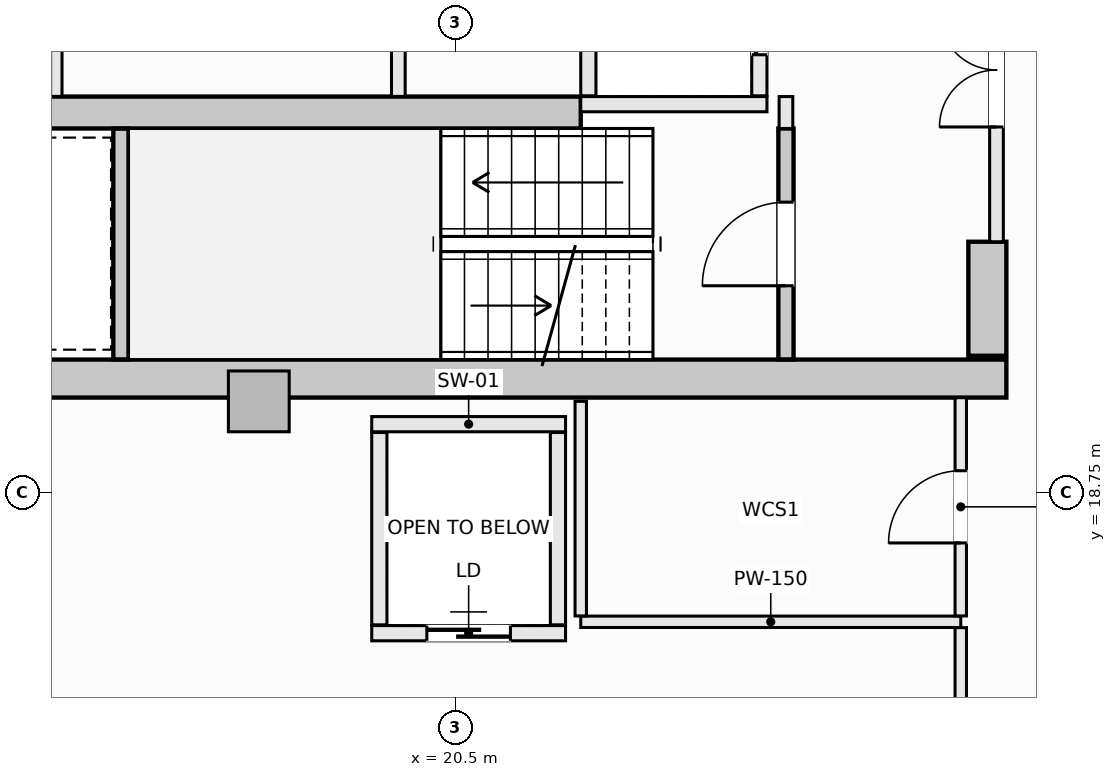
"""IFC4 building model, lengths in metres.
Left out: names, types, materials, properties, quantities, classifications, styles, units other than length and angle.
Written with IfcOpenShell. Run it as: python <this file> out.ifc"""

import sys

from ifc_helpers import new_model, si_unit, direction, frame, frame_2d, origin, origin_2d, place, context, subcontext, project, spatial, rectangle, extrude, element, fill, save


model = new_model("IFC4")
c1 = context("Model", 3, precision=1e-05, world=origin(), true_north=direction((0.0, 1.0)))
c2 = subcontext(c1, "Body", "Model", "MODEL_VIEW")
j1 = project(units=[si_unit("LENGTHUNIT", "METRE"), si_unit("PLANEANGLEUNIT", "RADIAN")], contexts=[c1])
p1 = place(None, origin())
s1 = spatial("IfcSite", under=j1, at=p1, CompositionType="ELEMENT")
p2 = place(p1, origin())
s2 = spatial("IfcBuilding", under=s1, at=p2, CompositionType="ELEMENT")
p3 = place(p2, frame((0.0, 0.0, 209.6)))
s3 = spatial("IfcBuildingStorey", under=s2, at=p3, CompositionType="ELEMENT", Elevation=209.6)
p4 = place(p3, frame((14.25, 20.25, -0.27), z_axis=(0.0, 0.0, 1.0), x_axis=(1.0, 0.0, 0.0)))
e1 = element("IfcWall", 1, at=p4, inside=s3, PredefinedType="SHEAR", context=c2, shape_type="SweptSolid", body=[
    extrude(rectangle(XDim=13.5, YDim=0.5, at=frame_2d((6.75, 0.0))), origin(), (0.0, 0.0, 1.0), 3.3),
])
p5 = place(p3, frame((27.5, 20.55, -0.27), z_axis=(0.0, 0.0, 1.0), x_axis=(0.0, 1.0, 0.0)))
e2 = element("IfcWall", 2, at=p5, inside=s3, PredefinedType="SHEAR", context=c2, shape_type="SweptSolid", body=[
    extrude(rectangle(XDim=1.5, YDim=0.5, at=frame_2d((0.75, 0.0))), origin(), (0.0, 0.0, 1.0), 3.3),
])
p6 = place(p3, frame((14.85, 23.75, -0.27), z_axis=(0.0, 0.0, 1.0), x_axis=(1.0, 0.0, 0.0)))
e3 = element("IfcWall", 3, at=p6, inside=s3, PredefinedType="SHEAR", context=c2, shape_type="SweptSolid", body=[
    extrude(rectangle(XDim=7.3, YDim=0.42, at=frame_2d((3.65, 0.0))), origin(), (0.0, 0.0, 1.0), 3.3),
])
p7 = place(p3, frame((17.914, 19.95, -0.27), z_axis=(0.0, 0.0, 1.0), x_axis=(1.0, 0.0, 0.0)))
e4 = element("IfcColumn", 4, at=p7, inside=s3, PredefinedType="PILASTER", context=c2, shape_type="SweptSolid", body=[
    extrude(rectangle(XDim=0.8, YDim=0.8, at=origin_2d()), origin(), (0.0, 0.0, 1.0), 3.3),
])
p8 = place(p3, frame((24.85, 20.502, -0.27), z_axis=(0.0, 0.0, 1.0), x_axis=(0.0, 1.0, 0.0)))
e5 = element("IfcWall", 5, at=p8, inside=s3, PredefinedType="SHEAR", context=c2, shape_type="SweptSolid", body=[
    extrude(rectangle(XDim=3.038, YDim=0.2, at=frame_2d((1.519, 0.0))), origin(), (0.0, 0.0, 1.0), 3.3),
])
p9 = place(p8, frame((0.969, 0.0, 0.27)))
e6 = element("IfcOpeningElement", 6, at=p9, cuts=e5, PredefinedType="OPENING", context=c2, shape_type="SweptSolid", body=[
    extrude(rectangle(XDim=1.1, YDim=2.15, at=frame_2d((0.55, 1.075))), frame((0.0, 0.11, 0.0), z_axis=(0.0, -1.0, 0.0), x_axis=(1.0, 0.0, 0.0)), (0.0, 0.0, 1.0), 0.22),
])
p10 = place(p3, frame((16.1, 20.502, -0.27), z_axis=(0.0, 0.0, 1.0), x_axis=(0.0, 1.0, 0.0)))
e7 = element("IfcWall", 7, at=p10, inside=s3, PredefinedType="SHEAR", context=c2, shape_type="SweptSolid", body=[
    extrude(rectangle(XDim=3.036, YDim=0.2, at=frame_2d((1.518, 0.0))), origin(), (0.0, 0.0, 1.0), 3.3),
])
p11 = place(p3, frame((22.15, 23.86, 0.0), z_axis=(0.0, 0.0, 1.0), x_axis=(1.0, 0.0, 0.0)))
e8 = element("IfcWall", 8, at=p11, inside=s3, PredefinedType="SOLIDWALL", context=c2, shape_type="SweptSolid", body=[
    extrude(rectangle(XDim=2.45, YDim=0.2, at=frame_2d((1.225, 0.0))), origin(), (0.0, 0.0, 1.0), 3.03),
])
p12 = place(p3, frame((22.25, 23.97, 0.0), z_axis=(0.0, 0.0, 1.0), x_axis=(0.0, 1.0, 0.0)))
e9 = element("IfcWall", 9, at=p12, inside=s3, PredefinedType="SOLIDWALL", context=c2, shape_type="SweptSolid", body=[
    extrude(rectangle(XDim=2.18, YDim=0.2, at=frame_2d((1.09, 0.0))), origin(), (0.0, 0.0, 1.0), 3.03),
])
p13 = place(p3, frame((24.5, 23.97, 0.0), z_axis=(0.0, 0.0, 1.0), x_axis=(0.0, 1.0, 0.0)))
e10 = element("IfcWall", 10, at=p13, inside=s3, PredefinedType="SOLIDWALL", context=c2, shape_type="SweptSolid", body=[
    extrude(rectangle(XDim=2.18, YDim=0.2, at=frame_2d((1.09, 0.0))), origin(), (0.0, 0.0, 1.0), 3.03),
])
p14 = place(p13, frame((0.54, 0.0, 0.0)))
e11 = element("IfcOpeningElement", 11, at=p14, cuts=e10, PredefinedType="OPENING", context=c2, shape_type="SweptSolid", body=[
    extrude(rectangle(XDim=1.1, YDim=2.2, at=frame_2d((0.55, 1.1))), frame((0.0, 0.11, 0.0), z_axis=(0.0, -1.0, 0.0), x_axis=(1.0, 0.0, 0.0)), (0.0, 0.0, 1.0), 0.22),
])
p15 = place(p3, frame((19.4, 19.65, 0.0), z_axis=(0.0, 0.0, 1.0), x_axis=(1.0, 0.0, 0.0)))
e12 = element("IfcWall", 12, at=p15, inside=s3, PredefinedType="SOLIDWALL", context=c2, shape_type="SweptSolid", body=[
    extrude(rectangle(XDim=2.55, YDim=0.2, at=frame_2d((1.275, 0.0))), origin(), (0.0, 0.0, 1.0), 3.03),
])
p16 = place(p3, frame((19.4, 16.9, 0.0), z_axis=(0.0, 0.0, 1.0), x_axis=(1.0, 0.0, 0.0)))
e13 = element("IfcWall", 13, at=p16, inside=s3, PredefinedType="SOLIDWALL", context=c2, shape_type="SweptSolid", body=[
    extrude(rectangle(XDim=2.55, YDim=0.2, at=frame_2d((1.275, 0.0))), origin(), (0.0, 0.0, 1.0), 3.03),
])
p17 = place(p16, frame((0.725, 0.0, 0.0)))
e14 = element("IfcOpeningElement", 14, at=p17, cuts=e13, PredefinedType="OPENING", context=c2, shape_type="SweptSolid", body=[
    extrude(rectangle(XDim=1.1, YDim=2.2, at=frame_2d((0.55, 1.1))), frame((0.0, 0.11, 0.0), z_axis=(0.0, -1.0, 0.0), x_axis=(1.0, 0.0, 0.0)), (0.0, 0.0, 1.0), 0.22),
])
for number, where, z_axis, x_axis in (
    (15, (19.5, 17.01, 0.0), (0.0, 0.0, 1.0), (0.0, 1.0, 0.0)),
    (16, (21.85, 17.01, 0.0), (0.0, 0.0, 1.0), (0.0, 1.0, 0.0)),
):
    element("IfcWall", number, at=place(p3, frame(where, z_axis=z_axis, x_axis=x_axis)), inside=s3, PredefinedType="SOLIDWALL", context=c2, shape_type="SweptSolid", body=[
        extrude(rectangle(XDim=2.53, YDim=0.2, at=frame_2d((1.265, 0.0))), origin(), (0.0, 0.0, 1.0), 3.03),
    ])
p18 = place(p3, frame((24.85, 23.54, 0.0), z_axis=(0.0, 0.0, 1.0), x_axis=(0.0, 1.0, 0.0)))
e17 = element("IfcWall", 17, at=p18, inside=s3, PredefinedType="SOLIDWALL", context=c2, shape_type="SweptSolid", body=[
    extrude(rectangle(XDim=0.42, YDim=0.18, at=frame_2d((0.21, 0.0))), origin(), (0.0, 0.0, 1.0), 3.03),
])
p19 = place(p3, frame((27.62, 22.05, 0.0), z_axis=(0.0, 0.0, 1.0), x_axis=(0.0, 1.0, 0.0)))
e18 = element("IfcWall", 18, at=p19, inside=s3, PredefinedType="SOLIDWALL", context=c2, shape_type="SweptSolid", body=[
    extrude(rectangle(XDim=9.9, YDim=0.18, at=frame_2d((4.95, 0.0))), origin(), (0.0, 0.0, 1.0), 3.03),
])
p20 = place(p19, frame((4.475, 0.0, 0.0)))
e19 = element("IfcOpeningElement", 19, at=p20, cuts=e18, PredefinedType="OPENING", context=c2, shape_type="SweptSolid", body=[
    extrude(rectangle(XDim=0.95, YDim=2.1, at=frame_2d((0.475, 1.05))), frame((0.0, 0.1, 0.0), z_axis=(0.0, -1.0, 0.0), x_axis=(1.0, 0.0, 0.0)), (0.0, 0.0, 1.0), 0.2),
])
p21 = place(p19, frame((6.89, 0.0, 0.0)))
e20 = element("IfcOpeningElement", 20, at=p21, cuts=e18, PredefinedType="OPENING", context=c2, shape_type="SweptSolid", body=[
    extrude(rectangle(XDim=1.5, YDim=2.2, at=frame_2d((0.75, 1.1))), frame((0.0, 0.1, 0.0), z_axis=(0.0, -1.0, 0.0), x_axis=(1.0, 0.0, 0.0)), (0.0, 0.0, 1.0), 0.2),
])
p22 = place(p19, frame((1.51, 0.0, 0.0)))
e21 = element("IfcOpeningElement", 21, at=p22, cuts=e18, PredefinedType="OPENING", context=c2, shape_type="SweptSolid", body=[
    extrude(rectangle(XDim=1.5, YDim=2.2, at=frame_2d((0.75, 1.1))), frame((0.0, 0.1, 0.0), z_axis=(0.0, -1.0, 0.0), x_axis=(1.0, 0.0, 0.0)), (0.0, 0.0, 1.0), 0.2),
])
p23 = place(p3, frame((15.25, 23.962, 0.0), z_axis=(0.0, 0.0, 1.0), x_axis=(0.0, 1.0, 0.0)))
e22 = element("IfcWall", 22, at=p23, inside=s3, PredefinedType="PARTITIONING", context=c2, shape_type="SweptSolid", body=[
    extrude(rectangle(XDim=2.106, YDim=0.15, at=frame_2d((1.053, 0.0))), origin(), (0.0, 0.0, 1.0), 3.03),
])
p24 = place(p3, frame((19.75, 23.962, 0.0), z_axis=(0.0, 0.0, 1.0), x_axis=(0.0, 1.0, 0.0)))
e23 = element("IfcWall", 23, at=p24, inside=s3, PredefinedType="SOLIDWALL", context=c2, shape_type="SweptSolid", body=[
    extrude(rectangle(XDim=2.106, YDim=0.18, at=frame_2d((1.053, 0.0))), origin(), (0.0, 0.0, 1.0), 3.03),
])
p25 = place(p3, frame((22.15, 17.05, 0.0), z_axis=(0.0, 0.0, 1.0), x_axis=(1.0, 0.0, 0.0)))
e24 = element("IfcWall", 24, at=p25, inside=s3, PredefinedType="PARTITIONING", context=c2, shape_type="SweptSolid", body=[
    extrude(rectangle(XDim=5.0, YDim=0.15, at=frame_2d((2.5, 0.0))), origin(), (0.0, 0.0, 1.0), 3.03),
])
p26 = place(p3, frame((22.15, 17.127, 0.0), z_axis=(0.0, 0.0, 1.0), x_axis=(0.0, 1.0, 0.0)))
e25 = element("IfcWall", 25, at=p26, inside=s3, PredefinedType="PARTITIONING", context=c2, shape_type="SweptSolid", body=[
    extrude(rectangle(XDim=2.823, YDim=0.15, at=frame_2d((1.412, 0.0))), origin(), (0.0, 0.0, 1.0), 3.03),
])
p27 = place(p3, frame((27.15, 11.113, 0.0), z_axis=(0.0, 0.0, 1.0), x_axis=(0.0, 1.0, 0.0)))
e26 = element("IfcWall", 26, at=p27, inside=s3, PredefinedType="PARTITIONING", context=c2, shape_type="SweptSolid", body=[
    extrude(rectangle(XDim=5.86, YDim=0.15, at=frame_2d((2.93, 0.0))), origin(), (0.0, 0.0, 1.0), 3.03),
])
p28 = place(p27, frame((3.359, 0.0, 0.0)))
e27 = element("IfcOpeningElement", 27, at=p28, cuts=e26, PredefinedType="OPENING", context=c2, shape_type="SweptSolid", body=[
    extrude(rectangle(XDim=0.95, YDim=2.1, at=frame_2d((0.475, 1.05))), frame((0.0, 0.085, 0.0), z_axis=(0.0, -1.0, 0.0), x_axis=(1.0, 0.0, 0.0)), (0.0, 0.0, 1.0), 0.17),
])
p29 = place(p3, frame((27.15, 17.127, 0.0), z_axis=(0.0, 0.0, 1.0), x_axis=(0.0, 1.0, 0.0)))
e28 = element("IfcWall", 28, at=p29, inside=s3, PredefinedType="PARTITIONING", context=c2, shape_type="SweptSolid", body=[
    extrude(rectangle(XDim=2.871, YDim=0.15, at=frame_2d((1.436, 0.0))), origin(), (0.0, 0.0, 1.0), 3.03),
])
p30 = place(p29, frame((0.96, 0.0, 0.0)))
e29 = element("IfcOpeningElement", 29, at=p30, cuts=e28, PredefinedType="OPENING", context=c2, shape_type="SweptSolid", body=[
    extrude(rectangle(XDim=0.95, YDim=2.1, at=frame_2d((0.475, 1.05))), frame((0.0, 0.085, 0.0), z_axis=(0.0, -1.0, 0.0), x_axis=(1.0, 0.0, 0.0)), (0.0, 0.0, 1.0), 0.17),
])
p31 = place(p9, origin())
e30 = element("IfcDoor", 30, at=p31, inside=s3, OperationType="SINGLE_SWING_LEFT", PredefinedType="DOOR", context=c2, shape_type="SweptSolid", body=[
    extrude(rectangle(XDim=1.1, YDim=2.15, at=frame_2d((0.55, 1.075))), frame((0.0, 0.025, 0.0), z_axis=(0.0, -1.0, 0.0), x_axis=(1.0, 0.0, 0.0)), (0.0, 0.0, 1.0), 0.05),
])
fill(e6, e30)
p32 = place(p14, origin())
e31 = element("IfcDoor", 31, at=p32, inside=s3, OperationType="SLIDING_TO_LEFT", PredefinedType="DOOR", context=c2, shape_type="SweptSolid", body=[
    extrude(rectangle(XDim=1.1, YDim=2.2, at=frame_2d((0.55, 1.1))), frame((0.0, 0.025, 0.0), z_axis=(0.0, -1.0, 0.0), x_axis=(1.0, 0.0, 0.0)), (0.0, 0.0, 1.0), 0.05),
])
fill(e11, e31)
p33 = place(p17, origin())
e32 = element("IfcDoor", 32, at=p33, inside=s3, OperationType="SLIDING_TO_LEFT", PredefinedType="DOOR", context=c2, shape_type="SweptSolid", body=[
    extrude(rectangle(XDim=1.1, YDim=2.2, at=frame_2d((0.55, 1.1))), frame((0.0, 0.025, 0.0), z_axis=(0.0, -1.0, 0.0), x_axis=(1.0, 0.0, 0.0)), (0.0, 0.0, 1.0), 0.05),
])
fill(e14, e32)
p34 = place(p22, origin())
e33 = element("IfcDoor", 33, at=p34, inside=s3, OperationType="DOUBLE_DOOR_SINGLE_SWING", PredefinedType="DOOR", context=c2, shape_type="SweptSolid", body=[
    extrude(rectangle(XDim=1.5, YDim=2.2, at=frame_2d((0.75, 1.1))), frame((0.0, 0.025, 0.0), z_axis=(0.0, -1.0, 0.0), x_axis=(1.0, 0.0, 0.0)), (0.0, 0.0, 1.0), 0.05),
])
fill(e21, e33)
p35 = place(p30, origin())
e34 = element("IfcDoor", 34, at=p35, inside=s3, OperationType="SINGLE_SWING_LEFT", PredefinedType="DOOR", context=c2, shape_type="SweptSolid", body=[
    extrude(rectangle(XDim=0.95, YDim=2.1, at=frame_2d((0.475, 1.05))), frame((0.0, 0.025, 0.0), z_axis=(0.0, -1.0, 0.0), x_axis=(1.0, 0.0, 0.0)), (0.0, 0.0, 1.0), 0.05),
])
fill(e29, e34)
save(model, sys.argv[1])
